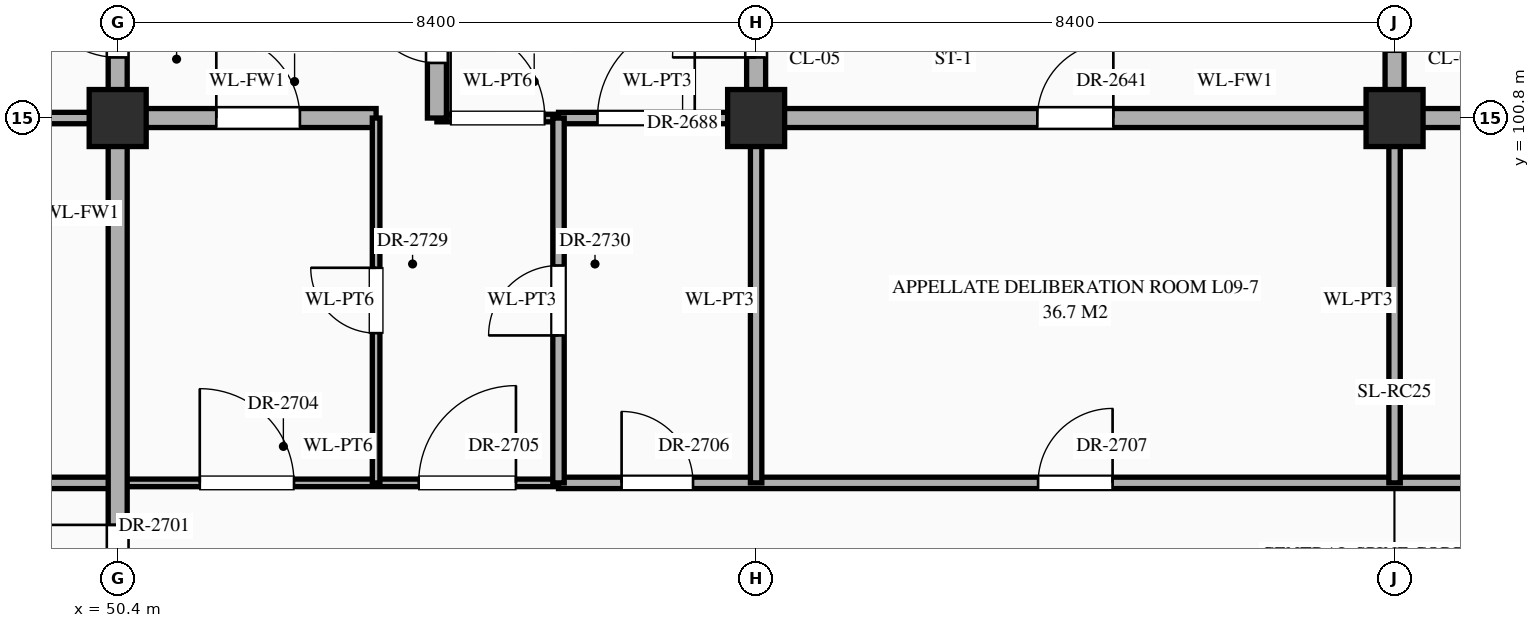
"""IFC4 building model, lengths in metres.
Left out: names, types, materials, properties, quantities, classifications, styles, units other than length and angle.
Written with IfcOpenShell. Run it as: python <this file> out.ifc"""

import sys

from ifc_helpers import new_model, si_unit, direction, frame, frame_2d, origin, origin_2d, place, context, subcontext, project, spatial, rectangle, extrude, element, fill, save


model = new_model("IFC4")
c1 = context("Model", 3, precision=1e-05, world=origin(), true_north=direction((0.0, 1.0)))
c2 = subcontext(c1, "Body", "Model", "MODEL_VIEW")
j1 = project(units=[si_unit("LENGTHUNIT", "METRE"), si_unit("PLANEANGLEUNIT", "RADIAN")], contexts=[c1])
p1 = place(None, origin())
s1 = spatial("IfcSite", under=j1, at=p1, CompositionType="ELEMENT")
p2 = place(p1, origin())
s2 = spatial("IfcBuilding", under=s1, at=p2, CompositionType="ELEMENT")
p3 = place(p2, frame((0.0, 0.0, 39.3)))
s3 = spatial("IfcBuildingStorey", under=s2, at=p3, CompositionType="ELEMENT", Elevation=39.3)
for number, where, z_axis, x_axis in (
    (1, (50.4, 100.8, 0.0), (0.0, 0.0, 1.0), (1.0, 0.0, 0.0)),
    (2, (58.8, 100.8, 0.0), (0.0, 0.0, 1.0), (1.0, 0.0, 0.0)),
    (3, (67.2, 100.8, 0.0), (0.0, 0.0, 1.0), (1.0, 0.0, 0.0)),
):
    element("IfcColumn", number, at=place(p3, frame(where, z_axis=z_axis, x_axis=x_axis)), inside=s3, PredefinedType="COLUMN", context=c2, shape_type="SweptSolid", body=[
        extrude(rectangle(XDim=0.75, YDim=0.75, at=origin_2d()), origin(), (0.0, 0.0, 1.0), 4.2),
    ])
p4 = place(p3, frame((42.04, 96.0, 0.0), z_axis=(0.0, 0.0, 1.0), x_axis=(1.0, 0.0, 0.0)))
e4 = element("IfcWall", 4, at=p4, inside=s3, PredefinedType="STANDARD", context=c2, shape_type="SweptSolid", body=[
    extrude(rectangle(XDim=8.36, YDim=0.15, at=frame_2d((4.18, 0.0))), origin(), (0.0, 0.0, 1.0), 3.95),
])
p5 = place(p4, frame((3.6, 0.0, 0.0)))
e5 = element("IfcOpeningElement", 5, at=p5, cuts=e4, PredefinedType="OPENING", context=c2, shape_type="SweptSolid", body=[
    extrude(rectangle(XDim=1.16, YDim=2.3, at=frame_2d((0.58, 1.15))), frame((0.0, 0.087, 0.0), z_axis=(0.0, -1.0, 0.0), x_axis=(1.0, 0.0, 0.0)), (0.0, 0.0, 1.0), 0.174),
])
p6 = place(p3, frame((50.4, 96.0, 0.0), z_axis=(0.0, 0.0, 1.0), x_axis=(1.0, 0.0, 0.0)))
e6 = element("IfcWall", 6, at=p6, inside=s3, PredefinedType="STANDARD", context=c2, shape_type="SweptSolid", body=[
    extrude(rectangle(XDim=5.8, YDim=0.1, at=frame_2d((2.9, 0.0))), origin(), (0.0, 0.0, 1.0), 3.95),
])
p7 = place(p6, frame((1.08, 0.0, 0.0)))
e7 = element("IfcOpeningElement", 7, at=p7, cuts=e6, PredefinedType="OPENING", context=c2, shape_type="SweptSolid", body=[
    extrude(rectangle(XDim=1.24, YDim=2.3, at=frame_2d((0.62, 1.15))), frame((0.0, 0.062, 0.0), z_axis=(0.0, -1.0, 0.0), x_axis=(1.0, 0.0, 0.0)), (0.0, 0.0, 1.0), 0.124),
])
p8 = place(p6, frame((3.96, 0.0, 0.0)))
e8 = element("IfcOpeningElement", 8, at=p8, cuts=e6, PredefinedType="OPENING", context=c2, shape_type="SweptSolid", body=[
    extrude(rectangle(XDim=1.28, YDim=2.35, at=frame_2d((0.64, 1.175))), frame((0.0, 0.062, 0.0), z_axis=(0.0, -1.0, 0.0), x_axis=(1.0, 0.0, 0.0)), (0.0, 0.0, 1.0), 0.124),
])
p9 = place(p3, frame((56.2, 96.0, 0.0), z_axis=(0.0, 0.0, 1.0), x_axis=(1.0, 0.0, 0.0)))
e9 = element("IfcWall", 9, at=p9, inside=s3, PredefinedType="STANDARD", context=c2, shape_type="SweptSolid", body=[
    extrude(rectangle(XDim=27.8, YDim=0.15, at=frame_2d((13.9, 0.0))), origin(), (0.0, 0.0, 1.0), 3.95),
])
p10 = place(p9, frame((0.83, 0.0, 0.0)))
e10 = element("IfcOpeningElement", 10, at=p10, cuts=e9, PredefinedType="OPENING", context=c2, shape_type="SweptSolid", body=[
    extrude(rectangle(XDim=0.94, YDim=2.3, at=frame_2d((0.47, 1.15))), frame((0.0, 0.087, 0.0), z_axis=(0.0, -1.0, 0.0), x_axis=(1.0, 0.0, 0.0)), (0.0, 0.0, 1.0), 0.174),
])
p11 = place(p9, frame((6.31, 0.0, 0.0)))
e11 = element("IfcOpeningElement", 11, at=p11, cuts=e9, PredefinedType="OPENING", context=c2, shape_type="SweptSolid", body=[
    extrude(rectangle(XDim=0.98, YDim=2.35, at=frame_2d((0.49, 1.175))), frame((0.0, 0.087, 0.0), z_axis=(0.0, -1.0, 0.0), x_axis=(1.0, 0.0, 0.0)), (0.0, 0.0, 1.0), 0.174),
])
p12 = place(p9, frame((14.69, 0.0, 0.0)))
e12 = element("IfcOpeningElement", 12, at=p12, cuts=e9, PredefinedType="OPENING", context=c2, shape_type="SweptSolid", body=[
    extrude(rectangle(XDim=1.02, YDim=2.4, at=frame_2d((0.51, 1.2))), frame((0.0, 0.087, 0.0), z_axis=(0.0, -1.0, 0.0), x_axis=(1.0, 0.0, 0.0)), (0.0, 0.0, 1.0), 0.174),
])
p13 = place(p9, frame((23.07, 0.0, 0.0)))
e13 = element("IfcOpeningElement", 13, at=p13, cuts=e9, PredefinedType="OPENING", context=c2, shape_type="SweptSolid", body=[
    extrude(rectangle(XDim=1.06, YDim=2.4, at=frame_2d((0.53, 1.2))), frame((0.0, 0.087, 0.0), z_axis=(0.0, -1.0, 0.0), x_axis=(1.0, 0.0, 0.0)), (0.0, 0.0, 1.0), 0.174),
])
p14 = place(p3, frame((46.2, 100.8, 0.0), z_axis=(0.0, 0.0, 1.0), x_axis=(1.0, 0.0, 0.0)))
e14 = element("IfcWall", 14, at=p14, inside=s3, PredefinedType="STANDARD", context=c2, shape_type="SweptSolid", body=[
    extrude(rectangle(XDim=4.2, YDim=0.15, at=frame_2d((2.1, 0.0))), origin(), (0.0, 0.0, 1.0), 3.1),
])
p15 = place(p14, frame((1.373, 0.0, 0.0)))
e15 = element("IfcOpeningElement", 15, at=p15, cuts=e14, PredefinedType="OPENING", context=c2, shape_type="SweptSolid", body=[
    extrude(rectangle(XDim=1.16, YDim=2.3, at=frame_2d((0.58, 1.15))), frame((0.0, 0.087, 0.0), z_axis=(0.0, -1.0, 0.0), x_axis=(1.0, 0.0, 0.0)), (0.0, 0.0, 1.0), 0.174),
])
p16 = place(p3, frame((50.4, 100.8, 0.0), z_axis=(0.0, 0.0, 1.0), x_axis=(1.0, 0.0, 0.0)))
e16 = element("IfcWall", 16, at=p16, inside=s3, PredefinedType="STANDARD", context=c2, shape_type="SweptSolid", body=[
    extrude(rectangle(XDim=3.4, YDim=0.25, at=frame_2d((1.7, 0.0))), origin(), (0.0, 0.0, 1.0), 3.1),
])
p17 = place(p16, frame((1.298, 0.0, 0.0)))
e17 = element("IfcOpeningElement", 17, at=p17, cuts=e16, PredefinedType="OPENING", context=c2, shape_type="SweptSolid", body=[
    extrude(rectangle(XDim=1.1, YDim=2.2, at=frame_2d((0.55, 1.1))), frame((0.0, 0.137, 0.0), z_axis=(0.0, -1.0, 0.0), x_axis=(1.0, 0.0, 0.0)), (0.0, 0.0, 1.0), 0.274),
])
p18 = place(p3, frame((54.6, 100.8, 0.0), z_axis=(0.0, 0.0, 1.0), x_axis=(1.0, 0.0, 0.0)))
e18 = element("IfcWall", 18, at=p18, inside=s3, PredefinedType="STANDARD", context=c2, shape_type="SweptSolid", body=[
    extrude(rectangle(XDim=1.6, YDim=0.1, at=frame_2d((0.8, 0.0))), origin(), (0.0, 0.0, 1.0), 3.1),
])
p19 = place(p18, frame((0.18, 0.0, 0.0)))
e19 = element("IfcOpeningElement", 19, at=p19, cuts=e18, PredefinedType="OPENING", context=c2, shape_type="SweptSolid", body=[
    extrude(rectangle(XDim=1.24, YDim=2.3, at=frame_2d((0.62, 1.15))), frame((0.0, 0.062, 0.0), z_axis=(0.0, -1.0, 0.0), x_axis=(1.0, 0.0, 0.0)), (0.0, 0.0, 1.0), 0.124),
])
p20 = place(p3, frame((56.2, 100.8, 0.0), z_axis=(0.0, 0.0, 1.0), x_axis=(1.0, 0.0, 0.0)))
e20 = element("IfcWall", 20, at=p20, inside=s3, PredefinedType="STANDARD", context=c2, shape_type="SweptSolid", body=[
    extrude(rectangle(XDim=2.6, YDim=0.15, at=frame_2d((1.3, 0.0))), origin(), (0.0, 0.0, 1.0), 3.1),
])
p21 = place(p20, frame((0.512, 0.0, 0.0)))
e21 = element("IfcOpeningElement", 21, at=p21, cuts=e20, PredefinedType="OPENING", context=c2, shape_type="SweptSolid", body=[
    extrude(rectangle(XDim=1.28, YDim=2.35, at=frame_2d((0.64, 1.175))), frame((0.0, 0.087, 0.0), z_axis=(0.0, -1.0, 0.0), x_axis=(1.0, 0.0, 0.0)), (0.0, 0.0, 1.0), 0.174),
])
p22 = place(p3, frame((58.8, 100.8, 0.0), z_axis=(0.0, 0.0, 1.0), x_axis=(1.0, 0.0, 0.0)))
e22 = element("IfcWall", 22, at=p22, inside=s3, PredefinedType="STANDARD", context=c2, shape_type="SweptSolid", body=[
    extrude(rectangle(XDim=12.6, YDim=0.25, at=frame_2d((6.3, 0.0))), origin(), (0.0, 0.0, 1.0), 3.1),
])
p23 = place(p22, frame((3.7, 0.0, 0.0)))
e23 = element("IfcOpeningElement", 23, at=p23, cuts=e22, PredefinedType="OPENING", context=c2, shape_type="SweptSolid", body=[
    extrude(rectangle(XDim=1.0, YDim=2.2, at=frame_2d((0.5, 1.1))), frame((0.0, 0.137, 0.0), z_axis=(0.0, -1.0, 0.0), x_axis=(1.0, 0.0, 0.0)), (0.0, 0.0, 1.0), 0.274),
])
p24 = place(p3, frame((50.4, 91.2, 0.0), z_axis=(0.0, 0.0, 1.0), x_axis=(0.0, 1.0, 0.0)))
e24 = element("IfcWall", 24, at=p24, inside=s3, PredefinedType="STANDARD", context=c2, shape_type="SweptSolid", body=[
    extrude(rectangle(XDim=13.2, YDim=0.25, at=frame_2d((6.6, 0.0))), origin(), (0.0, 0.0, 1.0), 3.2),
])
p25 = place(p24, frame((0.502, 0.0, 0.0)))
e25 = element("IfcOpeningElement", 25, at=p25, cuts=e24, PredefinedType="OPENING", context=c2, shape_type="SweptSolid", body=[
    extrude(rectangle(XDim=1.1, YDim=2.2, at=frame_2d((0.55, 1.1))), frame((0.0, 0.137, 0.0), z_axis=(0.0, -1.0, 0.0), x_axis=(1.0, 0.0, 0.0)), (0.0, 0.0, 1.0), 0.274),
])
p26 = place(p24, frame((10.397, 0.0, 0.0)))
e26 = element("IfcOpeningElement", 26, at=p26, cuts=e24, PredefinedType="OPENING", context=c2, shape_type="SweptSolid", body=[
    extrude(rectangle(XDim=1.1, YDim=2.2, at=frame_2d((0.55, 1.1))), frame((0.0, 0.137, 0.0), z_axis=(0.0, -1.0, 0.0), x_axis=(1.0, 0.0, 0.0)), (0.0, 0.0, 1.0), 0.274),
])
p27 = place(p24, frame((3.248, 0.0, 0.0)))
e27 = element("IfcOpeningElement", 27, at=p27, cuts=e24, PredefinedType="OPENING", context=c2, shape_type="SweptSolid", body=[
    extrude(rectangle(XDim=1.0, YDim=2.2, at=frame_2d((0.5, 1.1))), frame((0.0, 0.137, 0.0), z_axis=(0.0, -1.0, 0.0), x_axis=(1.0, 0.0, 0.0)), (0.0, 0.0, 1.0), 0.274),
])
p28 = place(p3, frame((53.8, 96.0, 0.0), z_axis=(0.0, 0.0, 1.0), x_axis=(0.0, 1.0, 0.0)))
e28 = element("IfcWall", 28, at=p28, inside=s3, PredefinedType="STANDARD", context=c2, shape_type="SweptSolid", body=[
    extrude(rectangle(XDim=4.8, YDim=0.1, at=frame_2d((2.4, 0.0))), origin(), (0.0, 0.0, 1.0), 3.95),
])
p29 = place(p28, frame((1.97, 0.0, 0.0)))
e29 = element("IfcOpeningElement", 29, at=p29, cuts=e28, PredefinedType="OPENING", context=c2, shape_type="SweptSolid", body=[
    extrude(rectangle(XDim=0.86, YDim=2.1, at=frame_2d((0.43, 1.05))), frame((0.0, 0.062, 0.0), z_axis=(0.0, -1.0, 0.0), x_axis=(1.0, 0.0, 0.0)), (0.0, 0.0, 1.0), 0.124),
])
p30 = place(p3, frame((54.6, 100.8, 0.0), z_axis=(0.0, 0.0, 1.0), x_axis=(0.0, 1.0, 0.0)))
e30 = element("IfcWall", 30, at=p30, inside=s3, PredefinedType="STANDARD", context=c2, shape_type="SweptSolid", body=[
    extrude(rectangle(XDim=3.6, YDim=0.25, at=frame_2d((1.8, 0.0))), origin(), (0.0, 0.0, 1.0), 3.65),
])
p31 = place(p30, frame((0.725, 0.0, 0.0)))
e31 = element("IfcOpeningElement", 31, at=p31, cuts=e30, PredefinedType="OPENING", context=c2, shape_type="SweptSolid", body=[
    extrude(rectangle(XDim=0.95, YDim=2.15, at=frame_2d((0.475, 1.075))), frame((0.0, 0.137, 0.0), z_axis=(0.0, -1.0, 0.0), x_axis=(1.0, 0.0, 0.0)), (0.0, 0.0, 1.0), 0.274),
])
p32 = place(p3, frame((56.2, 96.0, 0.0), z_axis=(0.0, 0.0, 1.0), x_axis=(0.0, 1.0, 0.0)))
e32 = element("IfcWall", 32, at=p32, inside=s3, PredefinedType="STANDARD", context=c2, shape_type="SweptSolid", body=[
    extrude(rectangle(XDim=4.8, YDim=0.15, at=frame_2d((2.4, 0.0))), origin(), (0.0, 0.0, 1.0), 3.95),
])
p33 = place(p32, frame((1.94, 0.0, 0.0)))
e33 = element("IfcOpeningElement", 33, at=p33, cuts=e32, PredefinedType="OPENING", context=c2, shape_type="SweptSolid", body=[
    extrude(rectangle(XDim=0.92, YDim=2.15, at=frame_2d((0.46, 1.075))), frame((0.0, 0.087, 0.0), z_axis=(0.0, -1.0, 0.0), x_axis=(1.0, 0.0, 0.0)), (0.0, 0.0, 1.0), 0.174),
])
p34 = place(p3, frame((58.8, 96.0, 0.0), z_axis=(0.0, 0.0, 1.0), x_axis=(0.0, 1.0, 0.0)))
e34 = element("IfcWall", 34, at=p34, inside=s3, PredefinedType="STANDARD", context=c2, shape_type="SweptSolid", body=[
    extrude(rectangle(XDim=4.8, YDim=0.15, at=frame_2d((2.4, 0.0))), origin(), (0.0, 0.0, 1.0), 3.2),
])
p35 = place(p3, frame((58.8, 100.8, 0.0), z_axis=(0.0, 0.0, 1.0), x_axis=(0.0, 1.0, 0.0)))
e35 = element("IfcWall", 35, at=p35, inside=s3, PredefinedType="STANDARD", context=c2, shape_type="SweptSolid", body=[
    extrude(rectangle(XDim=2.4, YDim=0.25, at=frame_2d((1.2, 0.0))), origin(), (0.0, 0.0, 1.0), 3.2),
])
p36 = place(p35, frame((0.798, 0.0, 0.0)))
e36 = element("IfcOpeningElement", 36, at=p36, cuts=e35, PredefinedType="OPENING", context=c2, shape_type="SweptSolid", body=[
    extrude(rectangle(XDim=1.1, YDim=2.2, at=frame_2d((0.55, 1.1))), frame((0.0, 0.137, 0.0), z_axis=(0.0, -1.0, 0.0), x_axis=(1.0, 0.0, 0.0)), (0.0, 0.0, 1.0), 0.274),
])
p37 = place(p3, frame((67.2, 96.0, 0.0), z_axis=(0.0, 0.0, 1.0), x_axis=(0.0, 1.0, 0.0)))
e37 = element("IfcWall", 37, at=p37, inside=s3, PredefinedType="STANDARD", context=c2, shape_type="SweptSolid", body=[
    extrude(rectangle(XDim=4.8, YDim=0.15, at=frame_2d((2.4, 0.0))), origin(), (0.0, 0.0, 1.0), 3.2),
])
p38 = place(p3, frame((67.2, 100.8, 0.0), z_axis=(0.0, 0.0, 1.0), x_axis=(0.0, 1.0, 0.0)))
e38 = element("IfcWall", 38, at=p38, inside=s3, PredefinedType="STANDARD", context=c2, shape_type="SweptSolid", body=[
    extrude(rectangle(XDim=2.4, YDim=0.25, at=frame_2d((1.2, 0.0))), origin(), (0.0, 0.0, 1.0), 3.2),
])
p39 = place(p38, frame((0.873, 0.0, 0.0)))
e39 = element("IfcOpeningElement", 39, at=p39, cuts=e38, PredefinedType="OPENING", context=c2, shape_type="SweptSolid", body=[
    extrude(rectangle(XDim=0.95, YDim=2.15, at=frame_2d((0.475, 1.075))), frame((0.0, 0.137, 0.0), z_axis=(0.0, -1.0, 0.0), x_axis=(1.0, 0.0, 0.0)), (0.0, 0.0, 1.0), 0.274),
])
p40 = place(p36, origin())
e40 = element("IfcDoor", 40, at=p40, inside=s3, OperationType="SINGLE_SWING_LEFT", PredefinedType="DOOR", context=c2, shape_type="SweptSolid", body=[
    extrude(rectangle(XDim=1.1, YDim=2.2, at=frame_2d((0.55, 1.1))), frame((0.0, 0.025, 0.0), z_axis=(0.0, -1.0, 0.0), x_axis=(1.0, 0.0, 0.0)), (0.0, 0.0, 1.0), 0.05),
])
fill(e36, e40)
p41 = place(p23, origin())
e41 = element("IfcDoor", 41, at=p41, inside=s3, OperationType="SINGLE_SWING_RIGHT", PredefinedType="DOOR", context=c2, shape_type="SweptSolid", body=[
    extrude(rectangle(XDim=1.0, YDim=2.2, at=frame_2d((0.5, 1.1))), frame((0.0, 0.025, 0.0), z_axis=(0.0, -1.0, 0.0), x_axis=(1.0, 0.0, 0.0)), (0.0, 0.0, 1.0), 0.05),
])
fill(e23, e41)
p42 = place(p26, origin())
e42 = element("IfcDoor", 42, at=p42, inside=s3, OperationType="SINGLE_SWING_RIGHT", PredefinedType="DOOR", context=c2, shape_type="SweptSolid", body=[
    extrude(rectangle(XDim=1.1, YDim=2.2, at=frame_2d((0.55, 1.1))), frame((0.0, 0.025, 0.0), z_axis=(0.0, -1.0, 0.0), x_axis=(1.0, 0.0, 0.0)), (0.0, 0.0, 1.0), 0.05),
])
fill(e26, e42)
p43 = place(p31, origin())
e43 = element("IfcDoor", 43, at=p43, inside=s3, OperationType="SINGLE_SWING_RIGHT", PredefinedType="DOOR", context=c2, shape_type="SweptSolid", body=[
    extrude(rectangle(XDim=0.95, YDim=2.15, at=frame_2d((0.475, 1.075))), frame((0.0, 0.025, 0.0), z_axis=(0.0, -1.0, 0.0), x_axis=(1.0, 0.0, 0.0)), (0.0, 0.0, 1.0), 0.05),
])
fill(e31, e43)
p44 = place(p17, origin())
e44 = element("IfcDoor", 44, at=p44, inside=s3, OperationType="SINGLE_SWING_LEFT", PredefinedType="DOOR", context=c2, shape_type="SweptSolid", body=[
    extrude(rectangle(XDim=1.1, YDim=2.2, at=frame_2d((0.55, 1.1))), frame((0.0, 0.025, 0.0), z_axis=(0.0, -1.0, 0.0), x_axis=(1.0, 0.0, 0.0)), (0.0, 0.0, 1.0), 0.05),
])
fill(e17, e44)
p45 = place(p19, origin())
e45 = element("IfcDoor", 45, at=p45, inside=s3, OperationType="SINGLE_SWING_LEFT", PredefinedType="DOOR", context=c2, shape_type="SweptSolid", body=[
    extrude(rectangle(XDim=1.24, YDim=2.3, at=frame_2d((0.62, 1.15))), frame((0.0, 0.025, 0.0), z_axis=(0.0, -1.0, 0.0), x_axis=(1.0, 0.0, 0.0)), (0.0, 0.0, 1.0), 0.05),
])
fill(e19, e45)
p46 = place(p21, origin())
e46 = element("IfcDoor", 46, at=p46, inside=s3, OperationType="SINGLE_SWING_RIGHT", PredefinedType="DOOR", context=c2, shape_type="SweptSolid", body=[
    extrude(rectangle(XDim=1.28, YDim=2.35, at=frame_2d((0.64, 1.175))), frame((0.0, 0.025, 0.0), z_axis=(0.0, -1.0, 0.0), x_axis=(1.0, 0.0, 0.0)), (0.0, 0.0, 1.0), 0.05),
])
fill(e21, e46)
p47 = place(p27, origin())
e47 = element("IfcDoor", 47, at=p47, inside=s3, OperationType="SINGLE_SWING_RIGHT", PredefinedType="DOOR", context=c2, shape_type="SweptSolid", body=[
    extrude(rectangle(XDim=1.0, YDim=2.2, at=frame_2d((0.5, 1.1))), frame((0.0, 0.025, 0.0), z_axis=(0.0, -1.0, 0.0), x_axis=(1.0, 0.0, 0.0)), (0.0, 0.0, 1.0), 0.05),
])
fill(e27, e47)
p48 = place(p7, origin())
e48 = element("IfcDoor", 48, at=p48, inside=s3, OperationType="SINGLE_SWING_LEFT", PredefinedType="DOOR", context=c2, shape_type="SweptSolid", body=[
    extrude(rectangle(XDim=1.24, YDim=2.3, at=frame_2d((0.62, 1.15))), frame((0.0, 0.025, 0.0), z_axis=(0.0, -1.0, 0.0), x_axis=(1.0, 0.0, 0.0)), (0.0, 0.0, 1.0), 0.05),
])
fill(e7, e48)
p49 = place(p8, origin())
e49 = element("IfcDoor", 49, at=p49, inside=s3, OperationType="SINGLE_SWING_RIGHT", PredefinedType="DOOR", context=c2, shape_type="SweptSolid", body=[
    extrude(rectangle(XDim=1.28, YDim=2.35, at=frame_2d((0.64, 1.175))), frame((0.0, 0.025, 0.0), z_axis=(0.0, -1.0, 0.0), x_axis=(1.0, 0.0, 0.0)), (0.0, 0.0, 1.0), 0.05),
])
fill(e8, e49)
p50 = place(p10, origin())
e50 = element("IfcDoor", 50, at=p50, inside=s3, OperationType="SINGLE_SWING_LEFT", PredefinedType="DOOR", context=c2, shape_type="SweptSolid", body=[
    extrude(rectangle(XDim=0.94, YDim=2.3, at=frame_2d((0.47, 1.15))), frame((0.0, 0.025, 0.0), z_axis=(0.0, -1.0, 0.0), x_axis=(1.0, 0.0, 0.0)), (0.0, 0.0, 1.0), 0.05),
])
fill(e10, e50)
p51 = place(p11, origin())
e51 = element("IfcDoor", 51, at=p51, inside=s3, OperationType="SINGLE_SWING_RIGHT", PredefinedType="DOOR", context=c2, shape_type="SweptSolid", body=[
    extrude(rectangle(XDim=0.98, YDim=2.35, at=frame_2d((0.49, 1.175))), frame((0.0, 0.025, 0.0), z_axis=(0.0, -1.0, 0.0), x_axis=(1.0, 0.0, 0.0)), (0.0, 0.0, 1.0), 0.05),
])
fill(e11, e51)
p52 = place(p29, origin())
e52 = element("IfcDoor", 52, at=p52, inside=s3, OperationType="SINGLE_SWING_RIGHT", PredefinedType="DOOR", context=c2, shape_type="SweptSolid", body=[
    extrude(rectangle(XDim=0.86, YDim=2.1, at=frame_2d((0.43, 1.05))), frame((0.0, 0.025, 0.0), z_axis=(0.0, -1.0, 0.0), x_axis=(1.0, 0.0, 0.0)), (0.0, 0.0, 1.0), 0.05),
])
fill(e29, e52)
p53 = place(p33, origin())
e53 = element("IfcDoor", 53, at=p53, inside=s3, OperationType="SINGLE_SWING_LEFT", PredefinedType="DOOR", context=c2, shape_type="SweptSolid", body=[
    extrude(rectangle(XDim=0.92, YDim=2.15, at=frame_2d((0.46, 1.075))), frame((0.0, 0.025, 0.0), z_axis=(0.0, -1.0, 0.0), x_axis=(1.0, 0.0, 0.0)), (0.0, 0.0, 1.0), 0.05),
])
fill(e33, e53)
save(model, sys.argv[1])
